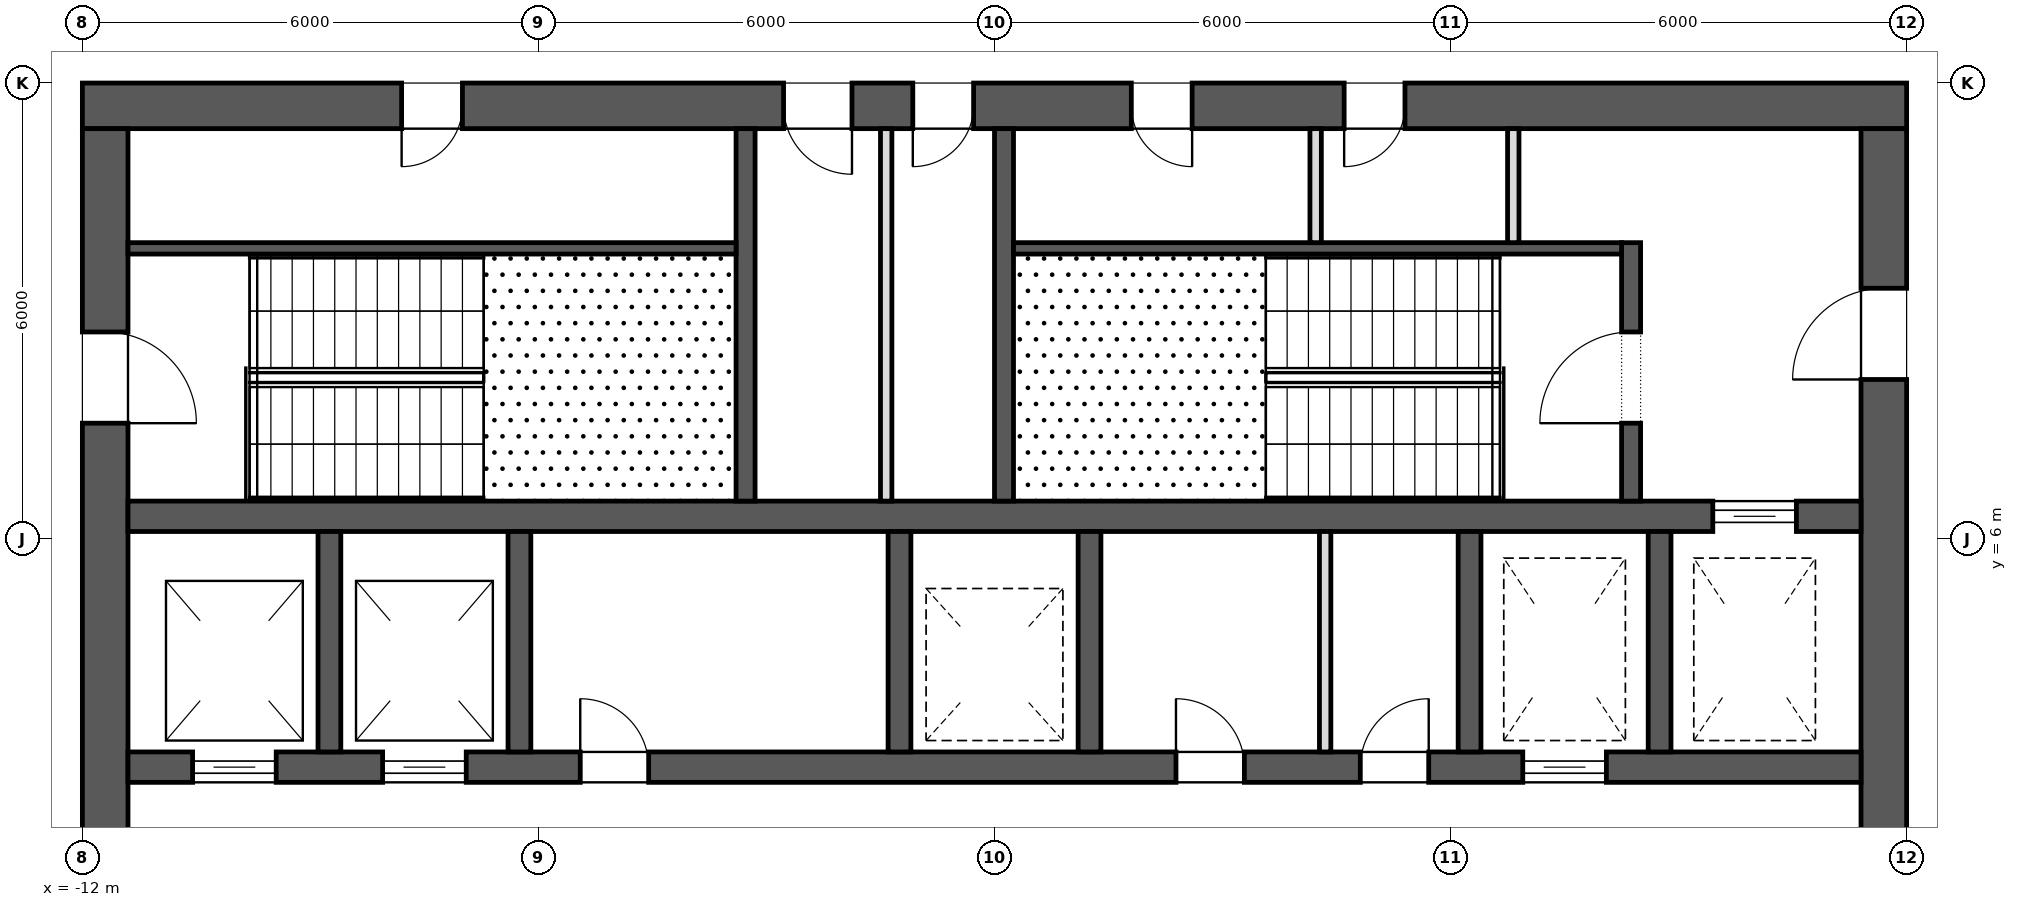
"""IFC4 building model, lengths in metres.
Left out: names, types, materials, properties, quantities, classifications, styles, units other than length and angle.
Written with IfcOpenShell. Run it as: python <this file> out.ifc"""

import sys

from ifc_helpers import new_model, si_unit, direction, frame, frame_2d, origin, place, context, subcontext, project, spatial, rectangle, extrude, element, fill, save


model = new_model("IFC4")
c1 = context("Model", 3, precision=1e-05, world=origin(), true_north=direction((0.0, 1.0)))
c2 = subcontext(c1, "Body", "Model", "MODEL_VIEW")
j1 = project(units=[si_unit("LENGTHUNIT", "METRE"), si_unit("PLANEANGLEUNIT", "RADIAN")], contexts=[c1])
p1 = place(None, origin())
s1 = spatial("IfcSite", under=j1, at=p1, CompositionType="ELEMENT")
p2 = place(p1, origin())
s2 = spatial("IfcBuilding", under=s1, at=p2, CompositionType="ELEMENT")
p3 = place(p2, frame((0.0, 0.0, 304.3)))
s3 = spatial("IfcBuildingStorey", under=s2, at=p3, CompositionType="ELEMENT", Elevation=304.3)
p4 = place(p3, frame((-12.0, 11.7, 0.0), z_axis=(0.0, 0.0, 1.0), x_axis=(1.0, 0.0, 0.0)))
e1 = element("IfcWall", 1, at=p4, inside=s3, PredefinedType="SHEAR", context=c2, shape_type="SweptSolid", body=[
    extrude(rectangle(XDim=24.0, YDim=0.6, at=frame_2d((12.0, 0.0))), origin(), (0.0, 0.0, 1.0), 4.0),
])
p5 = place(p4, frame((9.225, 0.0, 0.0)))
e2 = element("IfcOpeningElement", 2, at=p5, cuts=e1, PredefinedType="OPENING", context=c2, shape_type="SweptSolid", body=[
    extrude(rectangle(XDim=0.9, YDim=2.1, at=frame_2d((0.45, 1.05))), frame((0.0, 0.312, 0.0), z_axis=(0.0, -1.0, 0.0), x_axis=(1.0, 0.0, 0.0)), (0.0, 0.0, 1.0), 0.624),
])
p6 = place(p4, frame((10.925, 0.0, 0.0)))
e3 = element("IfcOpeningElement", 3, at=p6, cuts=e1, PredefinedType="OPENING", context=c2, shape_type="SweptSolid", body=[
    extrude(rectangle(XDim=0.8, YDim=2.1, at=frame_2d((0.4, 1.05))), frame((0.0, 0.312, 0.0), z_axis=(0.0, -1.0, 0.0), x_axis=(1.0, 0.0, 0.0)), (0.0, 0.0, 1.0), 0.624),
])
p7 = place(p4, frame((4.2, 0.0, 0.0)))
e4 = element("IfcOpeningElement", 4, at=p7, cuts=e1, PredefinedType="OPENING", context=c2, shape_type="SweptSolid", body=[
    extrude(rectangle(XDim=0.8, YDim=2.1, at=frame_2d((0.4, 1.05))), frame((0.0, 0.312, 0.0), z_axis=(0.0, -1.0, 0.0), x_axis=(1.0, 0.0, 0.0)), (0.0, 0.0, 1.0), 0.624),
])
p8 = place(p4, frame((13.8, 0.0, 0.0)))
e5 = element("IfcOpeningElement", 5, at=p8, cuts=e1, PredefinedType="OPENING", context=c2, shape_type="SweptSolid", body=[
    extrude(rectangle(XDim=0.8, YDim=2.1, at=frame_2d((0.4, 1.05))), frame((0.0, 0.312, 0.0), z_axis=(0.0, -1.0, 0.0), x_axis=(1.0, 0.0, 0.0)), (0.0, 0.0, 1.0), 0.624),
])
p9 = place(p4, frame((16.6, 0.0, 0.0)))
e6 = element("IfcOpeningElement", 6, at=p9, cuts=e1, PredefinedType="OPENING", context=c2, shape_type="SweptSolid", body=[
    extrude(rectangle(XDim=0.8, YDim=2.1, at=frame_2d((0.4, 1.05))), frame((0.0, 0.312, 0.0), z_axis=(0.0, -1.0, 0.0), x_axis=(1.0, 0.0, 0.0)), (0.0, 0.0, 1.0), 0.624),
])
p10 = place(p3, frame((11.7, -11.4, 0.0), z_axis=(0.0, 0.0, 1.0), x_axis=(0.0, 1.0, 0.0)))
e7 = element("IfcWall", 7, at=p10, inside=s3, PredefinedType="SHEAR", context=c2, shape_type="SweptSolid", body=[
    extrude(rectangle(XDim=22.8, YDim=0.6, at=frame_2d((11.4, 0.0))), origin(), (0.0, 0.0, 1.0), 4.0),
])
p11 = place(p10, frame((10.2, 0.0, 0.0)))
e8 = element("IfcOpeningElement", 8, at=p11, cuts=e7, PredefinedType="OPENING", context=c2, shape_type="SweptSolid", body=[
    extrude(rectangle(XDim=2.4, YDim=2.1, at=frame_2d((1.2, 1.05))), frame((0.0, 0.312, 0.0), z_axis=(0.0, -1.0, 0.0), x_axis=(1.0, 0.0, 0.0)), (0.0, 0.0, 1.0), 0.624),
])
p12 = place(p10, frame((19.5, 0.0, 0.0)))
e9 = element("IfcOpeningElement", 9, at=p12, cuts=e7, PredefinedType="OPENING", context=c2, shape_type="SweptSolid", body=[
    extrude(rectangle(XDim=1.2, YDim=2.1, at=frame_2d((0.6, 1.05))), frame((0.0, 0.312, 0.0), z_axis=(0.0, -1.0, 0.0), x_axis=(1.0, 0.0, 0.0)), (0.0, 0.0, 1.0), 0.624),
])
p13 = place(p10, frame((2.1, 0.0, 0.0)))
e10 = element("IfcOpeningElement", 10, at=p13, cuts=e7, PredefinedType="OPENING", context=c2, shape_type="SweptSolid", body=[
    extrude(rectangle(XDim=1.2, YDim=2.1, at=frame_2d((0.6, 1.05))), frame((0.0, 0.312, 0.0), z_axis=(0.0, -1.0, 0.0), x_axis=(1.0, 0.0, 0.0)), (0.0, 0.0, 1.0), 0.624),
])
p14 = place(p3, frame((-11.7, -11.4, 0.0), z_axis=(0.0, 0.0, 1.0), x_axis=(0.0, 1.0, 0.0)))
e11 = element("IfcWall", 11, at=p14, inside=s3, PredefinedType="SHEAR", context=c2, shape_type="SweptSolid", body=[
    extrude(rectangle(XDim=22.8, YDim=0.6, at=frame_2d((11.4, 0.0))), origin(), (0.0, 0.0, 1.0), 4.0),
])
p15 = place(p14, frame((10.2, 0.0, 0.0)))
e12 = element("IfcOpeningElement", 12, at=p15, cuts=e11, PredefinedType="OPENING", context=c2, shape_type="SweptSolid", body=[
    extrude(rectangle(XDim=2.4, YDim=2.1, at=frame_2d((1.2, 1.05))), frame((0.0, 0.312, 0.0), z_axis=(0.0, -1.0, 0.0), x_axis=(1.0, 0.0, 0.0)), (0.0, 0.0, 1.0), 0.624),
])
p16 = place(p14, frame((18.925, 0.0, 0.0)))
e13 = element("IfcOpeningElement", 13, at=p16, cuts=e11, PredefinedType="OPENING", context=c2, shape_type="SweptSolid", body=[
    extrude(rectangle(XDim=1.2, YDim=2.1, at=frame_2d((0.6, 1.05))), frame((0.0, 0.312, 0.0), z_axis=(0.0, -1.0, 0.0), x_axis=(1.0, 0.0, 0.0)), (0.0, 0.0, 1.0), 0.624),
])
p17 = place(p14, frame((2.675, 0.0, 0.0)))
e14 = element("IfcOpeningElement", 14, at=p17, cuts=e11, PredefinedType="OPENING", context=c2, shape_type="SweptSolid", body=[
    extrude(rectangle(XDim=1.2, YDim=2.1, at=frame_2d((0.6, 1.05))), frame((0.0, 0.312, 0.0), z_axis=(0.0, -1.0, 0.0), x_axis=(1.0, 0.0, 0.0)), (0.0, 0.0, 1.0), 0.624),
])
p18 = place(p3, frame((-11.4, 3.0, 0.0), z_axis=(0.0, 0.0, 1.0), x_axis=(1.0, 0.0, 0.0)))
e15 = element("IfcWall", 15, at=p18, inside=s3, PredefinedType="SHEAR", context=c2, shape_type="SweptSolid", body=[
    extrude(rectangle(XDim=22.8, YDim=0.4, at=frame_2d((11.4, 0.0))), origin(), (0.0, 0.0, 1.0), 4.0),
])
p19 = place(p18, frame((0.85, 0.0, 0.0)))
e16 = element("IfcOpeningElement", 16, at=p19, cuts=e15, PredefinedType="OPENING", context=c2, shape_type="SweptSolid", body=[
    extrude(rectangle(XDim=1.1, YDim=2.1, at=frame_2d((0.55, 1.05))), frame((0.0, 0.212, 0.0), z_axis=(0.0, -1.0, 0.0), x_axis=(1.0, 0.0, 0.0)), (0.0, 0.0, 1.0), 0.424),
])
p20 = place(p18, frame((3.35, 0.0, 0.0)))
e17 = element("IfcOpeningElement", 17, at=p20, cuts=e15, PredefinedType="OPENING", context=c2, shape_type="SweptSolid", body=[
    extrude(rectangle(XDim=1.1, YDim=2.1, at=frame_2d((0.55, 1.05))), frame((0.0, 0.212, 0.0), z_axis=(0.0, -1.0, 0.0), x_axis=(1.0, 0.0, 0.0)), (0.0, 0.0, 1.0), 0.424),
])
p21 = place(p18, frame((18.35, 0.0, 0.0)))
e18 = element("IfcOpeningElement", 18, at=p21, cuts=e15, PredefinedType="OPENING", context=c2, shape_type="SweptSolid", body=[
    extrude(rectangle(XDim=1.1, YDim=2.1, at=frame_2d((0.55, 1.05))), frame((0.0, 0.212, 0.0), z_axis=(0.0, -1.0, 0.0), x_axis=(1.0, 0.0, 0.0)), (0.0, 0.0, 1.0), 0.424),
])
p22 = place(p18, frame((13.788, 0.0, 0.0)))
e19 = element("IfcOpeningElement", 19, at=p22, cuts=e15, PredefinedType="OPENING", context=c2, shape_type="SweptSolid", body=[
    extrude(rectangle(XDim=0.9, YDim=2.1, at=frame_2d((0.45, 1.05))), frame((0.0, 0.212, 0.0), z_axis=(0.0, -1.0, 0.0), x_axis=(1.0, 0.0, 0.0)), (0.0, 0.0, 1.0), 0.424),
])
p23 = place(p18, frame((16.212, 0.0, 0.0)))
e20 = element("IfcOpeningElement", 20, at=p23, cuts=e15, PredefinedType="OPENING", context=c2, shape_type="SweptSolid", body=[
    extrude(rectangle(XDim=0.9, YDim=2.1, at=frame_2d((0.45, 1.05))), frame((0.0, 0.212, 0.0), z_axis=(0.0, -1.0, 0.0), x_axis=(1.0, 0.0, 0.0)), (0.0, 0.0, 1.0), 0.424),
])
p24 = place(p18, frame((5.95, 0.0, 0.0)))
e21 = element("IfcOpeningElement", 21, at=p24, cuts=e15, PredefinedType="OPENING", context=c2, shape_type="SweptSolid", body=[
    extrude(rectangle(XDim=0.9, YDim=2.1, at=frame_2d((0.45, 1.05))), frame((0.0, 0.212, 0.0), z_axis=(0.0, -1.0, 0.0), x_axis=(1.0, 0.0, 0.0)), (0.0, 0.0, 1.0), 0.424),
])
p25 = place(p3, frame((-11.4, 6.3, 0.0), z_axis=(0.0, 0.0, 1.0), x_axis=(1.0, 0.0, 0.0)))
e22 = element("IfcWall", 22, at=p25, inside=s3, PredefinedType="SHEAR", context=c2, shape_type="SweptSolid", body=[
    extrude(rectangle(XDim=22.8, YDim=0.4, at=frame_2d((11.4, 0.0))), origin(), (0.0, 0.0, 1.0), 4.0),
])
p26 = place(p25, frame((20.85, 0.0, 0.0)))
e23 = element("IfcOpeningElement", 23, at=p26, cuts=e22, PredefinedType="OPENING", context=c2, shape_type="SweptSolid", body=[
    extrude(rectangle(XDim=1.1, YDim=2.1, at=frame_2d((0.55, 1.05))), frame((0.0, 0.212, 0.0), z_axis=(0.0, -1.0, 0.0), x_axis=(1.0, 0.0, 0.0)), (0.0, 0.0, 1.0), 0.424),
])
for number, where, z_axis, x_axis in (
    (24, (-8.75, 3.2, 0.0), (0.0, 0.0, 1.0), (0.0, 1.0, 0.0)),
    (25, (-6.25, 3.2, 0.0), (0.0, 0.0, 1.0), (0.0, 1.0, 0.0)),
    (26, (-1.25, 3.2, 0.0), (0.0, 0.0, 1.0), (0.0, 1.0, 0.0)),
    (27, (1.25, 3.2, 0.0), (0.0, 0.0, 1.0), (0.0, 1.0, 0.0)),
    (28, (6.25, 3.2, 0.0), (0.0, 0.0, 1.0), (0.0, 1.0, 0.0)),
    (29, (8.75, 3.2, 0.0), (0.0, 0.0, 1.0), (0.0, 1.0, 0.0)),
):
    element("IfcWall", number, at=place(p3, frame(where, z_axis=z_axis, x_axis=x_axis)), inside=s3, PredefinedType="SHEAR", context=c2, shape_type="SweptSolid", body=[
        extrude(rectangle(XDim=2.9, YDim=0.3, at=frame_2d((1.45, 0.0))), origin(), (0.0, 0.0, 1.0), 4.0),
    ])
for number, where, z_axis, x_axis in (
    (30, (-3.275, 6.5, 0.0), (0.0, 0.0, 1.0), (0.0, 1.0, 0.0)),
    (31, (0.125, 6.5, 0.0), (0.0, 0.0, 1.0), (0.0, 1.0, 0.0)),
):
    element("IfcWall", number, at=place(p3, frame(where, z_axis=z_axis, x_axis=x_axis)), inside=s3, PredefinedType="SHEAR", context=c2, shape_type="SweptSolid", body=[
        extrude(rectangle(XDim=4.9, YDim=0.25, at=frame_2d((2.45, 0.0))), origin(), (0.0, 0.0, 1.0), 3.7),
    ])
p27 = place(p3, frame((8.375, 6.5, 0.0), z_axis=(0.0, 0.0, 1.0), x_axis=(0.0, 1.0, 0.0)))
e32 = element("IfcWall", 32, at=p27, inside=s3, PredefinedType="SHEAR", context=c2, shape_type="SweptSolid", body=[
    extrude(rectangle(XDim=3.4, YDim=0.25, at=frame_2d((1.7, 0.0))), origin(), (0.0, 0.0, 1.0), 3.7),
])
p28 = place(p27, frame((1.025, 0.0, 0.0)))
e33 = element("IfcOpeningElement", 33, at=p28, cuts=e32, PredefinedType="OPENING", context=c2, shape_type="SweptSolid", body=[
    extrude(rectangle(XDim=1.2, YDim=2.1, at=frame_2d((0.6, 1.05))), frame((0.0, 0.137, 0.0), z_axis=(0.0, -1.0, 0.0), x_axis=(1.0, 0.0, 0.0)), (0.0, 0.0, 1.0), 0.274),
])
for number, where, z_axis, x_axis in (
    (34, (-11.4, 9.825, 0.0), (0.0, 0.0, 1.0), (1.0, 0.0, 0.0)),
    (35, (0.25, 9.825, 0.0), (0.0, 0.0, 1.0), (1.0, 0.0, 0.0)),
):
    element("IfcWall", number, at=place(p3, frame(where, z_axis=z_axis, x_axis=x_axis)), inside=s3, PredefinedType="SHEAR", context=c2, shape_type="SweptSolid", body=[
        extrude(rectangle(XDim=8.0, YDim=0.15, at=frame_2d((4.0, 0.0))), origin(), (0.0, 0.0, 1.0), 3.7),
    ])
p29 = place(p3, frame((-1.425, 6.5, 0.0), z_axis=(0.0, 0.0, 1.0), x_axis=(0.0, 1.0, 0.0)))
e36 = element("IfcWall", 36, at=p29, inside=s3, PredefinedType="PARTITIONING", context=c2, shape_type="SweptSolid", body=[
    extrude(rectangle(XDim=4.9, YDim=0.15, at=frame_2d((2.45, 0.0))), origin(), (0.0, 0.0, 1.0), 3.7),
])
for number, where, z_axis, x_axis in (
    (37, (4.225, 9.9, 0.0), (0.0, 0.0, 1.0), (0.0, 1.0, 0.0)),
    (38, (6.825, 9.9, 0.0), (0.0, 0.0, 1.0), (0.0, 1.0, 0.0)),
):
    element("IfcWall", number, at=place(p3, frame(where, z_axis=z_axis, x_axis=x_axis)), inside=s3, PredefinedType="PARTITIONING", context=c2, shape_type="SweptSolid", body=[
        extrude(rectangle(XDim=1.5, YDim=0.15, at=frame_2d((0.75, 0.0))), origin(), (0.0, 0.0, 1.0), 3.7),
    ])
p30 = place(p3, frame((4.35, 3.2, 0.0), z_axis=(0.0, 0.0, 1.0), x_axis=(0.0, 1.0, 0.0)))
e39 = element("IfcWall", 39, at=p30, inside=s3, PredefinedType="PARTITIONING", context=c2, shape_type="SweptSolid", body=[
    extrude(rectangle(XDim=2.9, YDim=0.15, at=frame_2d((1.45, 0.0))), origin(), (0.0, 0.0, 1.0), 3.7),
])
p31 = place(p26, origin())
e40 = element("IfcDoor", 40, at=p31, inside=s3, OperationType="SLIDING_TO_LEFT", PredefinedType="DOOR", context=c2, shape_type="SweptSolid", body=[
    extrude(rectangle(XDim=1.1, YDim=2.1, at=frame_2d((0.55, 1.05))), frame((0.0, 0.025, 0.0), z_axis=(0.0, -1.0, 0.0), x_axis=(1.0, 0.0, 0.0)), (0.0, 0.0, 1.0), 0.05),
])
fill(e23, e40)
p32 = place(p19, origin())
e41 = element("IfcDoor", 41, at=p32, inside=s3, OperationType="SLIDING_TO_LEFT", PredefinedType="DOOR", context=c2, shape_type="SweptSolid", body=[
    extrude(rectangle(XDim=1.1, YDim=2.1, at=frame_2d((0.55, 1.05))), frame((0.0, 0.025, 0.0), z_axis=(0.0, -1.0, 0.0), x_axis=(1.0, 0.0, 0.0)), (0.0, 0.0, 1.0), 0.05),
])
fill(e16, e41)
p33 = place(p20, origin())
e42 = element("IfcDoor", 42, at=p33, inside=s3, OperationType="SLIDING_TO_LEFT", PredefinedType="DOOR", context=c2, shape_type="SweptSolid", body=[
    extrude(rectangle(XDim=1.1, YDim=2.1, at=frame_2d((0.55, 1.05))), frame((0.0, 0.025, 0.0), z_axis=(0.0, -1.0, 0.0), x_axis=(1.0, 0.0, 0.0)), (0.0, 0.0, 1.0), 0.05),
])
fill(e17, e42)
p34 = place(p21, origin())
e43 = element("IfcDoor", 43, at=p34, inside=s3, OperationType="SLIDING_TO_LEFT", PredefinedType="DOOR", context=c2, shape_type="SweptSolid", body=[
    extrude(rectangle(XDim=1.1, YDim=2.1, at=frame_2d((0.55, 1.05))), frame((0.0, 0.025, 0.0), z_axis=(0.0, -1.0, 0.0), x_axis=(1.0, 0.0, 0.0)), (0.0, 0.0, 1.0), 0.05),
])
fill(e18, e43)
p35 = place(p16, frame((1.2, 0.0, 0.0), z_axis=(0.0, 0.0, 1.0), x_axis=(-1.0, 0.0, 0.0)))
e44 = element("IfcDoor", 44, at=p35, inside=s3, OperationType="SINGLE_SWING_LEFT", PredefinedType="DOOR", context=c2, shape_type="SweptSolid", body=[
    extrude(rectangle(XDim=1.2, YDim=2.1, at=frame_2d((0.6, 1.05))), frame((0.0, 0.025, 0.0), z_axis=(0.0, -1.0, 0.0), x_axis=(1.0, 0.0, 0.0)), (0.0, 0.0, 1.0), 0.05),
])
fill(e13, e44)
p36 = place(p28, origin())
e45 = element("IfcDoor", 45, at=p36, inside=s3, OperationType="SINGLE_SWING_RIGHT", PredefinedType="DOOR", context=c2, shape_type="SweptSolid", body=[
    extrude(rectangle(XDim=1.2, YDim=2.1, at=frame_2d((0.6, 1.05))), frame((0.0, 0.025, 0.0), z_axis=(0.0, -1.0, 0.0), x_axis=(1.0, 0.0, 0.0)), (0.0, 0.0, 1.0), 0.05),
])
fill(e33, e45)
p37 = place(p12, origin())
e46 = element("IfcDoor", 46, at=p37, inside=s3, OperationType="SINGLE_SWING_RIGHT", PredefinedType="DOOR", context=c2, shape_type="SweptSolid", body=[
    extrude(rectangle(XDim=1.2, YDim=2.1, at=frame_2d((0.6, 1.05))), frame((0.0, 0.025, 0.0), z_axis=(0.0, -1.0, 0.0), x_axis=(1.0, 0.0, 0.0)), (0.0, 0.0, 1.0), 0.05),
])
fill(e9, e46)
p38 = place(p5, frame((0.9, 0.0, 0.0), z_axis=(0.0, 0.0, 1.0), x_axis=(-1.0, 0.0, 0.0)))
e47 = element("IfcDoor", 47, at=p38, inside=s3, OperationType="SINGLE_SWING_RIGHT", PredefinedType="DOOR", context=c2, shape_type="SweptSolid", body=[
    extrude(rectangle(XDim=0.9, YDim=2.1, at=frame_2d((0.45, 1.05))), frame((0.0, 0.025, 0.0), z_axis=(0.0, -1.0, 0.0), x_axis=(1.0, 0.0, 0.0)), (0.0, 0.0, 1.0), 0.05),
])
fill(e2, e47)
p39 = place(p6, frame((0.8, 0.0, 0.0), z_axis=(0.0, 0.0, 1.0), x_axis=(-1.0, 0.0, 0.0)))
e48 = element("IfcDoor", 48, at=p39, inside=s3, OperationType="SINGLE_SWING_LEFT", PredefinedType="DOOR", context=c2, shape_type="SweptSolid", body=[
    extrude(rectangle(XDim=0.8, YDim=2.1, at=frame_2d((0.4, 1.05))), frame((0.0, 0.025, 0.0), z_axis=(0.0, -1.0, 0.0), x_axis=(1.0, 0.0, 0.0)), (0.0, 0.0, 1.0), 0.05),
])
fill(e3, e48)
p40 = place(p7, frame((0.8, 0.0, 0.0), z_axis=(0.0, 0.0, 1.0), x_axis=(-1.0, 0.0, 0.0)))
e49 = element("IfcDoor", 49, at=p40, inside=s3, OperationType="SINGLE_SWING_LEFT", PredefinedType="DOOR", context=c2, shape_type="SweptSolid", body=[
    extrude(rectangle(XDim=0.8, YDim=2.1, at=frame_2d((0.4, 1.05))), frame((0.0, 0.025, 0.0), z_axis=(0.0, -1.0, 0.0), x_axis=(1.0, 0.0, 0.0)), (0.0, 0.0, 1.0), 0.05),
])
fill(e4, e49)
p41 = place(p8, frame((0.8, 0.0, 0.0), z_axis=(0.0, 0.0, 1.0), x_axis=(-1.0, 0.0, 0.0)))
e50 = element("IfcDoor", 50, at=p41, inside=s3, OperationType="SINGLE_SWING_RIGHT", PredefinedType="DOOR", context=c2, shape_type="SweptSolid", body=[
    extrude(rectangle(XDim=0.8, YDim=2.1, at=frame_2d((0.4, 1.05))), frame((0.0, 0.025, 0.0), z_axis=(0.0, -1.0, 0.0), x_axis=(1.0, 0.0, 0.0)), (0.0, 0.0, 1.0), 0.05),
])
fill(e5, e50)
p42 = place(p9, frame((0.8, 0.0, 0.0), z_axis=(0.0, 0.0, 1.0), x_axis=(-1.0, 0.0, 0.0)))
e51 = element("IfcDoor", 51, at=p42, inside=s3, OperationType="SINGLE_SWING_LEFT", PredefinedType="DOOR", context=c2, shape_type="SweptSolid", body=[
    extrude(rectangle(XDim=0.8, YDim=2.1, at=frame_2d((0.4, 1.05))), frame((0.0, 0.025, 0.0), z_axis=(0.0, -1.0, 0.0), x_axis=(1.0, 0.0, 0.0)), (0.0, 0.0, 1.0), 0.05),
])
fill(e6, e51)
p43 = place(p22, origin())
e52 = element("IfcDoor", 52, at=p43, inside=s3, OperationType="SINGLE_SWING_RIGHT", PredefinedType="DOOR", context=c2, shape_type="SweptSolid", body=[
    extrude(rectangle(XDim=0.9, YDim=2.1, at=frame_2d((0.45, 1.05))), frame((0.0, 0.025, 0.0), z_axis=(0.0, -1.0, 0.0), x_axis=(1.0, 0.0, 0.0)), (0.0, 0.0, 1.0), 0.05),
])
fill(e19, e52)
p44 = place(p23, origin())
e53 = element("IfcDoor", 53, at=p44, inside=s3, OperationType="SINGLE_SWING_LEFT", PredefinedType="DOOR", context=c2, shape_type="SweptSolid", body=[
    extrude(rectangle(XDim=0.9, YDim=2.1, at=frame_2d((0.45, 1.05))), frame((0.0, 0.025, 0.0), z_axis=(0.0, -1.0, 0.0), x_axis=(1.0, 0.0, 0.0)), (0.0, 0.0, 1.0), 0.05),
])
fill(e20, e53)
p45 = place(p24, origin())
e54 = element("IfcDoor", 54, at=p45, inside=s3, OperationType="SINGLE_SWING_RIGHT", PredefinedType="DOOR", context=c2, shape_type="SweptSolid", body=[
    extrude(rectangle(XDim=0.9, YDim=2.1, at=frame_2d((0.45, 1.05))), frame((0.0, 0.025, 0.0), z_axis=(0.0, -1.0, 0.0), x_axis=(1.0, 0.0, 0.0)), (0.0, 0.0, 1.0), 0.05),
])
fill(e21, e54)
save(model, sys.argv[1])
